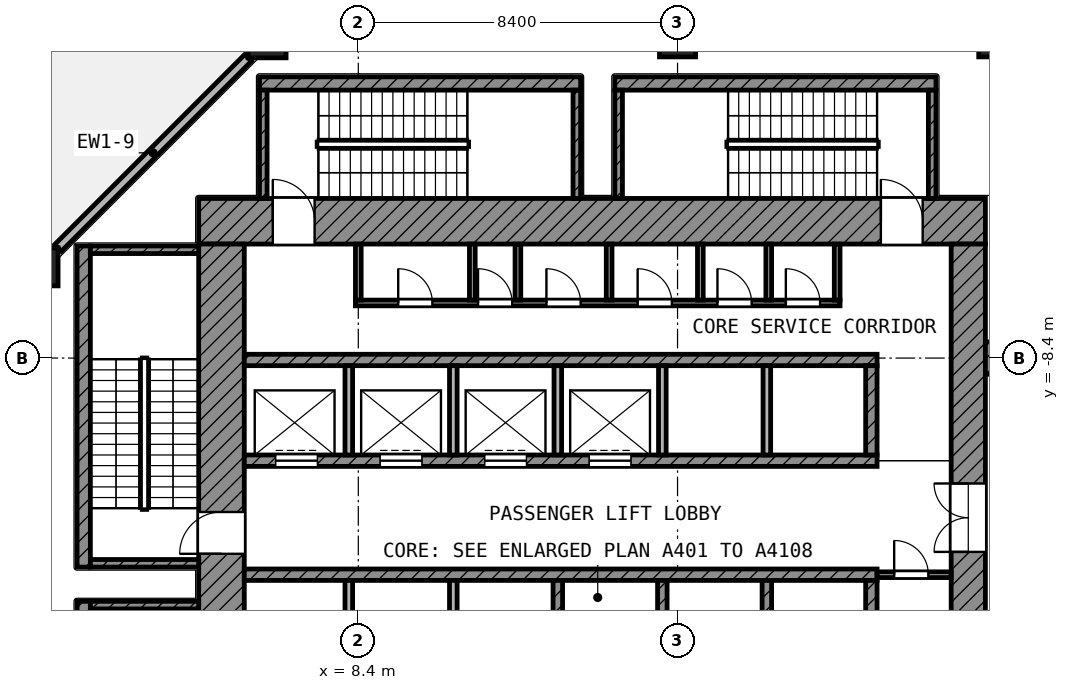
"""IFC4 building model, lengths in metres.
Left out: names, types, materials, properties, quantities, classifications, styles, units other than length and angle.
Written with IfcOpenShell. Run it as: python <this file> out.ifc"""

import sys

from ifc_helpers import new_model, si_unit, direction, frame, frame_2d, origin, origin_2d, place, context, subcontext, project, spatial, rectangle, extrude, element, fill, save


model = new_model("IFC4")
c1 = context("Model", 3, precision=1e-05, world=origin(), true_north=direction((0.0, 1.0)))
c2 = subcontext(c1, "Body", "Model", "MODEL_VIEW")
j1 = project(units=[si_unit("LENGTHUNIT", "METRE"), si_unit("PLANEANGLEUNIT", "RADIAN")], contexts=[c1])
p1 = place(None, origin())
s1 = spatial("IfcSite", under=j1, at=p1, CompositionType="ELEMENT")
p2 = place(p1, origin())
s2 = spatial("IfcBuilding", under=s1, at=p2, CompositionType="ELEMENT")
p3 = place(p2, frame((0.0, 0.0, 153.4)))
s3 = spatial("IfcBuildingStorey", under=s2, at=p3, CompositionType="ELEMENT", Elevation=153.4)
p4 = place(p3, frame((6.0, 0.0, 0.0), z_axis=(0.0, 0.0, 1.0), x_axis=(1.0, 0.0, 0.0)))
e1 = element("IfcColumn", 1, at=p4, inside=s3, PredefinedType="COLUMN", context=c2, shape_type="SweptSolid", body=[
    extrude(rectangle(XDim=1.0, YDim=1.0, at=origin_2d()), origin(), (0.0, 0.0, 1.0), 5.0),
])
for number, where, z_axis, x_axis in (
    (2, (16.8, 0.0, 0.0), (0.0, 0.0, 1.0), (1.0, 0.0, 0.0)),
    (3, (25.2, 0.0, 0.0), (0.0, 0.0, 1.0), (1.0, 0.0, 0.0)),
):
    element("IfcColumn", number, at=place(p3, frame(where, z_axis=z_axis, x_axis=x_axis)), inside=s3, PredefinedType="COLUMN", context=c2, shape_type="SweptSolid", body=[
        extrude(rectangle(XDim=0.95, YDim=0.95, at=origin_2d()), origin(), (0.0, 0.0, 1.0), 5.0),
    ])
p5 = place(p3, frame((0.0, -6.0, 0.0), z_axis=(0.0, 0.0, 1.0), x_axis=(1.0, 0.0, 0.0)))
e4 = element("IfcColumn", 4, at=p5, inside=s3, PredefinedType="COLUMN", context=c2, shape_type="SweptSolid", body=[
    extrude(rectangle(XDim=1.0, YDim=1.0, at=origin_2d()), origin(), (0.0, 0.0, 1.0), 5.0),
])
p6 = place(p3, frame((24.9, -8.4, 0.0), z_axis=(0.0, 0.0, 1.0), x_axis=(1.0, 0.0, 0.0)))
e5 = element("IfcWall", 5, at=p6, inside=s3, PredefinedType="SHEAR", context=c2, shape_type="SweptSolid", body=[
    extrude(rectangle(XDim=8.2, YDim=0.85, at=frame_2d((4.1, 0.0))), origin(), (0.0, 0.0, 1.0), 4.4),
])
p7 = place(p3, frame((5.5, -0.5, 0.0), z_axis=(0.0, 0.0, 1.0), x_axis=(-0.707106781187, -0.707106781187, 0.0)))
e6 = element("IfcWall", 6, at=p7, inside=s3, PredefinedType="SOLIDWALL", context=c2, shape_type="SweptSolid", body=[
    extrude(rectangle(XDim=7.071, YDim=0.25, at=frame_2d((3.536, 0.0))), origin(), (0.0, 0.0, 1.0), 3.1),
])
p8 = place(p3, frame((4.2, -4.8, 0.0), z_axis=(0.0, 0.0, 1.0), x_axis=(1.0, 0.0, 0.0)))
e7 = element("IfcWall", 7, at=p8, inside=s3, PredefinedType="SHEAR", context=c2, shape_type="SweptSolid", body=[
    extrude(rectangle(XDim=20.7, YDim=1.2, at=frame_2d((10.35, 0.0))), origin(), (0.0, 0.0, 1.0), 4.4),
])
p9 = place(p8, frame((1.95, 0.0, 0.0)))
e8 = element("IfcOpeningElement", 8, at=p9, cuts=e7, PredefinedType="OPENING", context=c2, shape_type="SweptSolid", body=[
    extrude(rectangle(XDim=1.1, YDim=2.1, at=frame_2d((0.55, 1.05))), frame((0.0, 0.61, 0.0), z_axis=(0.0, -1.0, 0.0), x_axis=(1.0, 0.0, 0.0)), (0.0, 0.0, 1.0), 1.22),
])
p10 = place(p8, frame((17.95, 0.0, 0.0)))
e9 = element("IfcOpeningElement", 9, at=p10, cuts=e7, PredefinedType="OPENING", context=c2, shape_type="SweptSolid", body=[
    extrude(rectangle(XDim=1.1, YDim=2.1, at=frame_2d((0.55, 1.05))), frame((0.0, 0.61, 0.0), z_axis=(0.0, -1.0, 0.0), x_axis=(1.0, 0.0, 0.0)), (0.0, 0.0, 1.0), 1.22),
])
p11 = place(p3, frame((4.8, -24.9, 0.0), z_axis=(0.0, 0.0, 1.0), x_axis=(0.0, 1.0, 0.0)))
e10 = element("IfcWall", 10, at=p11, inside=s3, PredefinedType="SHEAR", context=c2, shape_type="SweptSolid", body=[
    extrude(rectangle(XDim=19.5, YDim=1.2, at=frame_2d((9.75, 0.0))), origin(), (0.0, 0.0, 1.0), 4.4),
])
p12 = place(p11, frame((11.35, 0.0, 0.0)))
e11 = element("IfcOpeningElement", 11, at=p12, cuts=e10, PredefinedType="OPENING", context=c2, shape_type="SweptSolid", body=[
    extrude(rectangle(XDim=1.1, YDim=2.1, at=frame_2d((0.55, 1.05))), frame((0.0, 0.61, 0.0), z_axis=(0.0, -1.0, 0.0), x_axis=(1.0, 0.0, 0.0)), (0.0, 0.0, 1.0), 1.22),
])
p13 = place(p11, frame((2.05, 0.0, 0.0)))
e12 = element("IfcOpeningElement", 12, at=p13, cuts=e10, PredefinedType="OPENING", context=c2, shape_type="SweptSolid", body=[
    extrude(rectangle(XDim=1.1, YDim=2.1, at=frame_2d((0.55, 1.05))), frame((0.0, 0.61, 0.0), z_axis=(0.0, -1.0, 0.0), x_axis=(1.0, 0.0, 0.0)), (0.0, 0.0, 1.0), 1.22),
])
p14 = place(p3, frame((24.45, -24.0, 0.0), z_axis=(0.0, 0.0, 1.0), x_axis=(0.0, 1.0, 0.0)))
e13 = element("IfcWall", 13, at=p14, inside=s3, PredefinedType="SHEAR", context=c2, shape_type="SweptSolid", body=[
    extrude(rectangle(XDim=18.6, YDim=0.9, at=frame_2d((9.3, 0.0))), origin(), (0.0, 0.0, 1.0), 4.4),
])
p15 = place(p14, frame((10.5, 0.0, 0.0)))
e14 = element("IfcOpeningElement", 14, at=p15, cuts=e13, PredefinedType="OPENING", context=c2, shape_type="SweptSolid", body=[
    extrude(rectangle(XDim=1.8, YDim=2.1, at=frame_2d((0.9, 1.05))), frame((0.0, 0.46, 0.0), z_axis=(0.0, -1.0, 0.0), x_axis=(1.0, 0.0, 0.0)), (0.0, 0.0, 1.0), 0.92),
])
p16 = place(p3, frame((5.4, -8.45, 0.0), z_axis=(0.0, 0.0, 1.0), x_axis=(1.0, 0.0, 0.0)))
e15 = element("IfcWall", 15, at=p16, inside=s3, PredefinedType="SHEAR", context=c2, shape_type="SweptSolid", body=[
    extrude(rectangle(XDim=16.65, YDim=0.3, at=frame_2d((8.325, 0.0))), origin(), (0.0, 0.0, 1.0), 4.4),
])
p17 = place(p3, frame((5.4, -11.1, 0.0), z_axis=(0.0, 0.0, 1.0), x_axis=(1.0, 0.0, 0.0)))
e16 = element("IfcWall", 16, at=p17, inside=s3, PredefinedType="SHEAR", context=c2, shape_type="SweptSolid", body=[
    extrude(rectangle(XDim=16.65, YDim=0.3, at=frame_2d((8.325, 0.0))), origin(), (0.0, 0.0, 1.0), 4.4),
])
p18 = place(p17, frame((0.825, 0.0, 0.0)))
e17 = element("IfcOpeningElement", 17, at=p18, cuts=e16, PredefinedType="OPENING", context=c2, shape_type="SweptSolid", body=[
    extrude(rectangle(XDim=1.1, YDim=2.1, at=frame_2d((0.55, 1.05))), frame((0.0, 0.16, 0.0), z_axis=(0.0, -1.0, 0.0), x_axis=(1.0, 0.0, 0.0)), (0.0, 0.0, 1.0), 0.32),
])
p19 = place(p17, frame((3.575, 0.0, 0.0)))
e18 = element("IfcOpeningElement", 18, at=p19, cuts=e16, PredefinedType="OPENING", context=c2, shape_type="SweptSolid", body=[
    extrude(rectangle(XDim=1.1, YDim=2.1, at=frame_2d((0.55, 1.05))), frame((0.0, 0.16, 0.0), z_axis=(0.0, -1.0, 0.0), x_axis=(1.0, 0.0, 0.0)), (0.0, 0.0, 1.0), 0.32),
])
p20 = place(p17, frame((6.325, 0.0, 0.0)))
e19 = element("IfcOpeningElement", 19, at=p20, cuts=e16, PredefinedType="OPENING", context=c2, shape_type="SweptSolid", body=[
    extrude(rectangle(XDim=1.1, YDim=2.1, at=frame_2d((0.55, 1.05))), frame((0.0, 0.16, 0.0), z_axis=(0.0, -1.0, 0.0), x_axis=(1.0, 0.0, 0.0)), (0.0, 0.0, 1.0), 0.32),
])
p21 = place(p17, frame((9.075, 0.0, 0.0)))
e20 = element("IfcOpeningElement", 20, at=p21, cuts=e16, PredefinedType="OPENING", context=c2, shape_type="SweptSolid", body=[
    extrude(rectangle(XDim=1.1, YDim=2.1, at=frame_2d((0.55, 1.05))), frame((0.0, 0.16, 0.0), z_axis=(0.0, -1.0, 0.0), x_axis=(1.0, 0.0, 0.0)), (0.0, 0.0, 1.0), 0.32),
])
p22 = place(p3, frame((5.4, -14.1, 0.0), z_axis=(0.0, 0.0, 1.0), x_axis=(1.0, 0.0, 0.0)))
e21 = element("IfcWall", 21, at=p22, inside=s3, PredefinedType="SHEAR", context=c2, shape_type="SweptSolid", body=[
    extrude(rectangle(XDim=16.65, YDim=0.3, at=frame_2d((8.325, 0.0))), origin(), (0.0, 0.0, 1.0), 4.4),
])
p23 = place(p3, frame((21.9, -10.95, 0.0), z_axis=(0.0, 0.0, 1.0), x_axis=(0.0, 1.0, 0.0)))
e22 = element("IfcWall", 22, at=p23, inside=s3, PredefinedType="SHEAR", context=c2, shape_type="SweptSolid", body=[
    extrude(rectangle(XDim=2.35, YDim=0.3, at=frame_2d((1.175, 0.0))), origin(), (0.0, 0.0, 1.0), 4.4),
])
p24 = place(p3, frame((21.9, -16.6, 0.0), z_axis=(0.0, 0.0, 1.0), x_axis=(0.0, 1.0, 0.0)))
e23 = element("IfcWall", 23, at=p24, inside=s3, PredefinedType="SHEAR", context=c2, shape_type="SweptSolid", body=[
    extrude(rectangle(XDim=2.35, YDim=0.3, at=frame_2d((1.175, 0.0))), origin(), (0.0, 0.0, 1.0), 4.4),
])
for number, where, z_axis, x_axis in (
    (24, (8.15, -10.95, 0.0), (0.0, 0.0, 1.0), (0.0, 1.0, 0.0)),
    (25, (10.9, -10.95, 0.0), (0.0, 0.0, 1.0), (0.0, 1.0, 0.0)),
    (26, (13.65, -10.95, 0.0), (0.0, 0.0, 1.0), (0.0, 1.0, 0.0)),
    (27, (16.4, -10.95, 0.0), (0.0, 0.0, 1.0), (0.0, 1.0, 0.0)),
    (28, (19.15, -10.95, 0.0), (0.0, 0.0, 1.0), (0.0, 1.0, 0.0)),
):
    element("IfcWall", number, at=place(p3, frame(where, z_axis=z_axis, x_axis=x_axis)), inside=s3, PredefinedType="PARTITIONING", context=c2, shape_type="SweptSolid", body=[
        extrude(rectangle(XDim=2.35, YDim=0.2, at=frame_2d((1.175, 0.0))), origin(), (0.0, 0.0, 1.0), 4.4),
    ])
for number, where, z_axis, x_axis in (
    (29, (8.15, -16.6, 0.0), (0.0, 0.0, 1.0), (0.0, 1.0, 0.0)),
    (30, (10.9, -16.6, 0.0), (0.0, 0.0, 1.0), (0.0, 1.0, 0.0)),
):
    element("IfcWall", number, at=place(p3, frame(where, z_axis=z_axis, x_axis=x_axis)), inside=s3, PredefinedType="PARTITIONING", context=c2, shape_type="SweptSolid", body=[
        extrude(rectangle(XDim=2.35, YDim=0.2, at=frame_2d((1.175, 0.0))), origin(), (0.0, 0.0, 1.0), 4.4),
    ])
for number, where, z_axis, x_axis in (
    (31, (13.65, -16.6, 0.0), (0.0, 0.0, 1.0), (0.0, 1.0, 0.0)),
    (32, (16.4, -16.6, 0.0), (0.0, 0.0, 1.0), (0.0, 1.0, 0.0)),
    (33, (19.15, -16.6, 0.0), (0.0, 0.0, 1.0), (0.0, 1.0, 0.0)),
):
    element("IfcWall", number, at=place(p3, frame(where, z_axis=z_axis, x_axis=x_axis)), inside=s3, PredefinedType="SHEAR", context=c2, shape_type="SweptSolid", body=[
        extrude(rectangle(XDim=2.35, YDim=0.25, at=frame_2d((1.175, 0.0))), origin(), (0.0, 0.0, 1.0), 4.4),
    ])
p25 = place(p3, frame((22.05, -14.1, 0.0), z_axis=(0.0, 0.0, 1.0), x_axis=(1.0, 0.0, 0.0)))
e34 = element("IfcWall", 34, at=p25, inside=s3, PredefinedType="PARTITIONING", context=c2, shape_type="SweptSolid", body=[
    extrude(rectangle(XDim=1.95, YDim=0.15, at=frame_2d((0.975, 0.0))), origin(), (0.0, 0.0, 1.0), 4.4),
])
p26 = place(p25, frame((0.45, 0.0, 0.0)))
e35 = element("IfcOpeningElement", 35, at=p26, cuts=e34, PredefinedType="OPENING", context=c2, shape_type="SweptSolid", body=[
    extrude(rectangle(XDim=0.9, YDim=2.1, at=frame_2d((0.45, 1.05))), frame((0.0, 0.085, 0.0), z_axis=(0.0, -1.0, 0.0), x_axis=(1.0, 0.0, 0.0)), (0.0, 0.0, 1.0), 0.17),
])
p27 = place(p3, frame((8.325, -6.95, 0.0), z_axis=(0.0, 0.0, 1.0), x_axis=(1.0, 0.0, 0.0)))
e36 = element("IfcWall", 36, at=p27, inside=s3, PredefinedType="PARTITIONING", context=c2, shape_type="SweptSolid", body=[
    extrude(rectangle(XDim=12.75, YDim=0.15, at=frame_2d((6.375, 0.0))), origin(), (0.0, 0.0, 1.0), 4.4),
])
p28 = place(p27, frame((1.125, 0.0, 0.0)))
e37 = element("IfcOpeningElement", 37, at=p28, cuts=e36, PredefinedType="OPENING", context=c2, shape_type="SweptSolid", body=[
    extrude(rectangle(XDim=0.9, YDim=2.1, at=frame_2d((0.45, 1.05))), frame((0.0, 0.085, 0.0), z_axis=(0.0, -1.0, 0.0), x_axis=(1.0, 0.0, 0.0)), (0.0, 0.0, 1.0), 0.17),
])
p29 = place(p27, frame((3.225, 0.0, 0.0)))
e38 = element("IfcOpeningElement", 38, at=p29, cuts=e36, PredefinedType="OPENING", context=c2, shape_type="SweptSolid", body=[
    extrude(rectangle(XDim=0.9, YDim=2.1, at=frame_2d((0.45, 1.05))), frame((0.0, 0.085, 0.0), z_axis=(0.0, -1.0, 0.0), x_axis=(1.0, 0.0, 0.0)), (0.0, 0.0, 1.0), 0.17),
])
p30 = place(p27, frame((5.025, 0.0, 0.0)))
e39 = element("IfcOpeningElement", 39, at=p30, cuts=e36, PredefinedType="OPENING", context=c2, shape_type="SweptSolid", body=[
    extrude(rectangle(XDim=0.9, YDim=2.1, at=frame_2d((0.45, 1.05))), frame((0.0, 0.085, 0.0), z_axis=(0.0, -1.0, 0.0), x_axis=(1.0, 0.0, 0.0)), (0.0, 0.0, 1.0), 0.17),
])
p31 = place(p27, frame((7.425, 0.0, 0.0)))
e40 = element("IfcOpeningElement", 40, at=p31, cuts=e36, PredefinedType="OPENING", context=c2, shape_type="SweptSolid", body=[
    extrude(rectangle(XDim=0.9, YDim=2.1, at=frame_2d((0.45, 1.05))), frame((0.0, 0.085, 0.0), z_axis=(0.0, -1.0, 0.0), x_axis=(1.0, 0.0, 0.0)), (0.0, 0.0, 1.0), 0.17),
])
p32 = place(p27, frame((9.525, 0.0, 0.0)))
e41 = element("IfcOpeningElement", 41, at=p32, cuts=e36, PredefinedType="OPENING", context=c2, shape_type="SweptSolid", body=[
    extrude(rectangle(XDim=0.9, YDim=2.1, at=frame_2d((0.45, 1.05))), frame((0.0, 0.085, 0.0), z_axis=(0.0, -1.0, 0.0), x_axis=(1.0, 0.0, 0.0)), (0.0, 0.0, 1.0), 0.17),
])
p33 = place(p27, frame((11.325, 0.0, 0.0)))
e42 = element("IfcOpeningElement", 42, at=p33, cuts=e36, PredefinedType="OPENING", context=c2, shape_type="SweptSolid", body=[
    extrude(rectangle(XDim=0.9, YDim=2.1, at=frame_2d((0.45, 1.05))), frame((0.0, 0.085, 0.0), z_axis=(0.0, -1.0, 0.0), x_axis=(1.0, 0.0, 0.0)), (0.0, 0.0, 1.0), 0.17),
])
for number, where, z_axis, x_axis in (
    (43, (8.4, -6.875, 0.0), (0.0, 0.0, 1.0), (0.0, 1.0, 0.0)),
    (44, (11.4, -6.875, 0.0), (0.0, 0.0, 1.0), (0.0, 1.0, 0.0)),
    (45, (12.6, -6.875, 0.0), (0.0, 0.0, 1.0), (0.0, 1.0, 0.0)),
    (46, (15.0, -6.875, 0.0), (0.0, 0.0, 1.0), (0.0, 1.0, 0.0)),
    (47, (17.4, -6.875, 0.0), (0.0, 0.0, 1.0), (0.0, 1.0, 0.0)),
    (48, (19.2, -6.875, 0.0), (0.0, 0.0, 1.0), (0.0, 1.0, 0.0)),
    (49, (21.0, -6.875, 0.0), (0.0, 0.0, 1.0), (0.0, 1.0, 0.0)),
):
    element("IfcWall", number, at=place(p3, frame(where, z_axis=z_axis, x_axis=x_axis)), inside=s3, PredefinedType="PARTITIONING", context=c2, shape_type="SweptSolid", body=[
        extrude(rectangle(XDim=1.475, YDim=0.15, at=frame_2d((0.738, 0.0))), origin(), (0.0, 0.0, 1.0), 4.4),
    ])
p34 = place(p3, frame((1.175, -13.9, 0.0), z_axis=(0.0, 0.0, 1.0), x_axis=(0.0, 1.0, 0.0)))
e50 = element("IfcWall", 50, at=p34, inside=s3, PredefinedType="SHEAR", context=c2, shape_type="SweptSolid", body=[
    extrude(rectangle(XDim=8.45, YDim=0.35, at=frame_2d((4.225, 0.0))), origin(), (0.0, 0.0, 1.0), 4.4),
])
for number, where, z_axis, x_axis in (
    (51, (1.35, -5.55, 0.0), (0.0, 0.0, 1.0), (1.0, 0.0, 0.0)),
    (52, (1.35, -13.8, 0.0), (0.0, 0.0, 1.0), (1.0, 0.0, 0.0)),
):
    element("IfcWall", number, at=place(p3, frame(where, z_axis=z_axis, x_axis=x_axis)), inside=s3, PredefinedType="SHEAR", context=c2, shape_type="SweptSolid", body=[
        extrude(rectangle(XDim=2.85, YDim=0.2, at=frame_2d((1.425, 0.0))), origin(), (0.0, 0.0, 1.0), 4.4),
    ])
p35 = place(p3, frame((1.175, -23.25, 0.0), z_axis=(0.0, 0.0, 1.0), x_axis=(0.0, 1.0, 0.0)))
e53 = element("IfcWall", 53, at=p35, inside=s3, PredefinedType="SHEAR", context=c2, shape_type="SweptSolid", body=[
    extrude(rectangle(XDim=8.45, YDim=0.35, at=frame_2d((4.225, 0.0))), origin(), (0.0, 0.0, 1.0), 4.4),
])
p36 = place(p3, frame((1.35, -14.9, 0.0), z_axis=(0.0, 0.0, 1.0), x_axis=(1.0, 0.0, 0.0)))
e54 = element("IfcWall", 54, at=p36, inside=s3, PredefinedType="SHEAR", context=c2, shape_type="SweptSolid", body=[
    extrude(rectangle(XDim=2.85, YDim=0.2, at=frame_2d((1.425, 0.0))), origin(), (0.0, 0.0, 1.0), 4.4),
])
p37 = place(p3, frame((5.8, -1.175, 0.0), z_axis=(0.0, 0.0, 1.0), x_axis=(1.0, 0.0, 0.0)))
e55 = element("IfcWall", 55, at=p37, inside=s3, PredefinedType="SHEAR", context=c2, shape_type="SweptSolid", body=[
    extrude(rectangle(XDim=8.45, YDim=0.35, at=frame_2d((4.225, 0.0))), origin(), (0.0, 0.0, 1.0), 4.4),
])
for number, where, z_axis, x_axis in (
    (56, (5.9, -4.2, 0.0), (0.0, 0.0, 1.0), (0.0, 1.0, 0.0)),
    (57, (14.15, -4.2, 0.0), (0.0, 0.0, 1.0), (0.0, 1.0, 0.0)),
):
    element("IfcWall", number, at=place(p3, frame(where, z_axis=z_axis, x_axis=x_axis)), inside=s3, PredefinedType="SHEAR", context=c2, shape_type="SweptSolid", body=[
        extrude(rectangle(XDim=2.85, YDim=0.2, at=frame_2d((1.425, 0.0))), origin(), (0.0, 0.0, 1.0), 4.4),
    ])
p38 = place(p3, frame((15.15, -1.175, 0.0), z_axis=(0.0, 0.0, 1.0), x_axis=(1.0, 0.0, 0.0)))
e58 = element("IfcWall", 58, at=p38, inside=s3, PredefinedType="SHEAR", context=c2, shape_type="SweptSolid", body=[
    extrude(rectangle(XDim=8.45, YDim=0.35, at=frame_2d((4.225, 0.0))), origin(), (0.0, 0.0, 1.0), 4.4),
])
for number, where, z_axis, x_axis in (
    (59, (15.25, -4.2, 0.0), (0.0, 0.0, 1.0), (0.0, 1.0, 0.0)),
    (60, (23.5, -4.2, 0.0), (0.0, 0.0, 1.0), (0.0, 1.0, 0.0)),
):
    element("IfcWall", number, at=place(p3, frame(where, z_axis=z_axis, x_axis=x_axis)), inside=s3, PredefinedType="SHEAR", context=c2, shape_type="SweptSolid", body=[
        extrude(rectangle(XDim=2.85, YDim=0.2, at=frame_2d((1.425, 0.0))), origin(), (0.0, 0.0, 1.0), 4.4),
    ])
p39 = place(p18, origin())
e61 = element("IfcDoor", 61, at=p39, inside=s3, OperationType="DOUBLE_DOOR_SLIDING", PredefinedType="DOOR", context=c2, shape_type="SweptSolid", body=[
    extrude(rectangle(XDim=1.1, YDim=2.1, at=frame_2d((0.55, 1.05))), frame((0.0, 0.025, 0.0), z_axis=(0.0, -1.0, 0.0), x_axis=(1.0, 0.0, 0.0)), (0.0, 0.0, 1.0), 0.05),
])
fill(e17, e61)
p40 = place(p19, origin())
e62 = element("IfcDoor", 62, at=p40, inside=s3, OperationType="DOUBLE_DOOR_SLIDING", PredefinedType="DOOR", context=c2, shape_type="SweptSolid", body=[
    extrude(rectangle(XDim=1.1, YDim=2.1, at=frame_2d((0.55, 1.05))), frame((0.0, 0.025, 0.0), z_axis=(0.0, -1.0, 0.0), x_axis=(1.0, 0.0, 0.0)), (0.0, 0.0, 1.0), 0.05),
])
fill(e18, e62)
p41 = place(p20, origin())
e63 = element("IfcDoor", 63, at=p41, inside=s3, OperationType="DOUBLE_DOOR_SLIDING", PredefinedType="DOOR", context=c2, shape_type="SweptSolid", body=[
    extrude(rectangle(XDim=1.1, YDim=2.1, at=frame_2d((0.55, 1.05))), frame((0.0, 0.025, 0.0), z_axis=(0.0, -1.0, 0.0), x_axis=(1.0, 0.0, 0.0)), (0.0, 0.0, 1.0), 0.05),
])
fill(e19, e63)
p42 = place(p21, origin())
e64 = element("IfcDoor", 64, at=p42, inside=s3, OperationType="DOUBLE_DOOR_SLIDING", PredefinedType="DOOR", context=c2, shape_type="SweptSolid", body=[
    extrude(rectangle(XDim=1.1, YDim=2.1, at=frame_2d((0.55, 1.05))), frame((0.0, 0.025, 0.0), z_axis=(0.0, -1.0, 0.0), x_axis=(1.0, 0.0, 0.0)), (0.0, 0.0, 1.0), 0.05),
])
fill(e20, e64)
p43 = place(p12, origin())
e65 = element("IfcDoor", 65, at=p43, inside=s3, OperationType="SINGLE_SWING_LEFT", PredefinedType="DOOR", context=c2, shape_type="SweptSolid", body=[
    extrude(rectangle(XDim=1.1, YDim=2.1, at=frame_2d((0.55, 1.05))), frame((0.0, 0.025, 0.0), z_axis=(0.0, -1.0, 0.0), x_axis=(1.0, 0.0, 0.0)), (0.0, 0.0, 1.0), 0.05),
])
fill(e11, e65)
p44 = place(p9, origin())
e66 = element("IfcDoor", 66, at=p44, inside=s3, OperationType="SINGLE_SWING_LEFT", PredefinedType="DOOR", context=c2, shape_type="SweptSolid", body=[
    extrude(rectangle(XDim=1.1, YDim=2.1, at=frame_2d((0.55, 1.05))), frame((0.0, 0.025, 0.0), z_axis=(0.0, -1.0, 0.0), x_axis=(1.0, 0.0, 0.0)), (0.0, 0.0, 1.0), 0.05),
])
fill(e8, e66)
p45 = place(p10, origin())
e67 = element("IfcDoor", 67, at=p45, inside=s3, OperationType="SINGLE_SWING_LEFT", PredefinedType="DOOR", context=c2, shape_type="SweptSolid", body=[
    extrude(rectangle(XDim=1.1, YDim=2.1, at=frame_2d((0.55, 1.05))), frame((0.0, 0.025, 0.0), z_axis=(0.0, -1.0, 0.0), x_axis=(1.0, 0.0, 0.0)), (0.0, 0.0, 1.0), 0.05),
])
fill(e9, e67)
p46 = place(p15, origin())
e68 = element("IfcDoor", 68, at=p46, inside=s3, OperationType="DOUBLE_DOOR_SINGLE_SWING", PredefinedType="DOOR", context=c2, shape_type="SweptSolid", body=[
    extrude(rectangle(XDim=1.8, YDim=2.1, at=frame_2d((0.9, 1.05))), frame((0.0, 0.025, 0.0), z_axis=(0.0, -1.0, 0.0), x_axis=(1.0, 0.0, 0.0)), (0.0, 0.0, 1.0), 0.05),
])
fill(e14, e68)
p47 = place(p28, origin())
e69 = element("IfcDoor", 69, at=p47, inside=s3, OperationType="SINGLE_SWING_LEFT", PredefinedType="DOOR", context=c2, shape_type="SweptSolid", body=[
    extrude(rectangle(XDim=0.9, YDim=2.1, at=frame_2d((0.45, 1.05))), frame((0.0, 0.025, 0.0), z_axis=(0.0, -1.0, 0.0), x_axis=(1.0, 0.0, 0.0)), (0.0, 0.0, 1.0), 0.05),
])
fill(e37, e69)
p48 = place(p29, origin())
e70 = element("IfcDoor", 70, at=p48, inside=s3, OperationType="SINGLE_SWING_LEFT", PredefinedType="DOOR", context=c2, shape_type="SweptSolid", body=[
    extrude(rectangle(XDim=0.9, YDim=2.1, at=frame_2d((0.45, 1.05))), frame((0.0, 0.025, 0.0), z_axis=(0.0, -1.0, 0.0), x_axis=(1.0, 0.0, 0.0)), (0.0, 0.0, 1.0), 0.05),
])
fill(e38, e70)
p49 = place(p30, origin())
e71 = element("IfcDoor", 71, at=p49, inside=s3, OperationType="SINGLE_SWING_LEFT", PredefinedType="DOOR", context=c2, shape_type="SweptSolid", body=[
    extrude(rectangle(XDim=0.9, YDim=2.1, at=frame_2d((0.45, 1.05))), frame((0.0, 0.025, 0.0), z_axis=(0.0, -1.0, 0.0), x_axis=(1.0, 0.0, 0.0)), (0.0, 0.0, 1.0), 0.05),
])
fill(e39, e71)
p50 = place(p31, origin())
e72 = element("IfcDoor", 72, at=p50, inside=s3, OperationType="SINGLE_SWING_LEFT", PredefinedType="DOOR", context=c2, shape_type="SweptSolid", body=[
    extrude(rectangle(XDim=0.9, YDim=2.1, at=frame_2d((0.45, 1.05))), frame((0.0, 0.025, 0.0), z_axis=(0.0, -1.0, 0.0), x_axis=(1.0, 0.0, 0.0)), (0.0, 0.0, 1.0), 0.05),
])
fill(e40, e72)
p51 = place(p32, origin())
e73 = element("IfcDoor", 73, at=p51, inside=s3, OperationType="SINGLE_SWING_LEFT", PredefinedType="DOOR", context=c2, shape_type="SweptSolid", body=[
    extrude(rectangle(XDim=0.9, YDim=2.1, at=frame_2d((0.45, 1.05))), frame((0.0, 0.025, 0.0), z_axis=(0.0, -1.0, 0.0), x_axis=(1.0, 0.0, 0.0)), (0.0, 0.0, 1.0), 0.05),
])
fill(e41, e73)
p52 = place(p33, origin())
e74 = element("IfcDoor", 74, at=p52, inside=s3, OperationType="SINGLE_SWING_LEFT", PredefinedType="DOOR", context=c2, shape_type="SweptSolid", body=[
    extrude(rectangle(XDim=0.9, YDim=2.1, at=frame_2d((0.45, 1.05))), frame((0.0, 0.025, 0.0), z_axis=(0.0, -1.0, 0.0), x_axis=(1.0, 0.0, 0.0)), (0.0, 0.0, 1.0), 0.05),
])
fill(e42, e74)
p53 = place(p26, origin())
e75 = element("IfcDoor", 75, at=p53, inside=s3, OperationType="SINGLE_SWING_LEFT", PredefinedType="DOOR", context=c2, shape_type="SweptSolid", body=[
    extrude(rectangle(XDim=0.9, YDim=2.1, at=frame_2d((0.45, 1.05))), frame((0.0, 0.025, 0.0), z_axis=(0.0, -1.0, 0.0), x_axis=(1.0, 0.0, 0.0)), (0.0, 0.0, 1.0), 0.05),
])
fill(e35, e75)
save(model, sys.argv[1])
